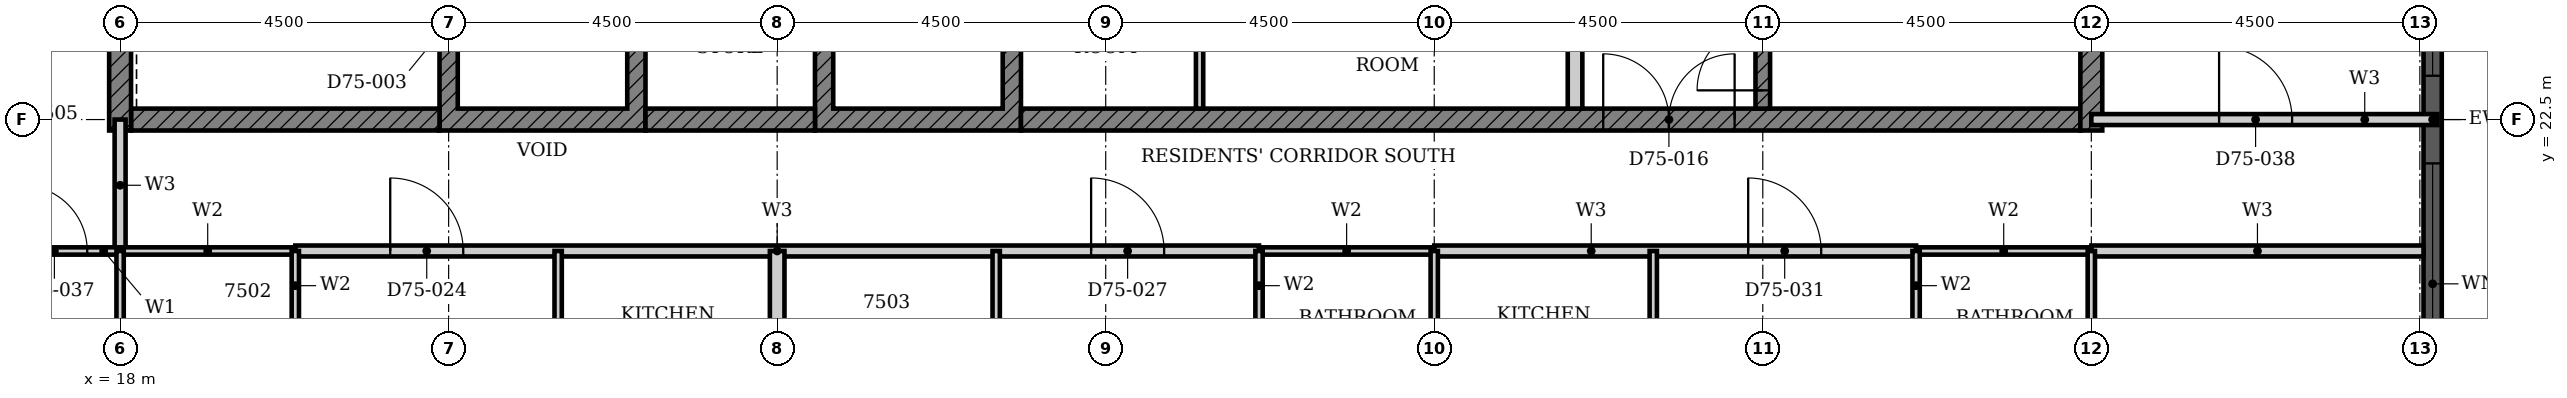
"""IFC4 building model, lengths in metres.
Left out: names, types, materials, properties, quantities, classifications, styles, units other than length and angle.
Written with IfcOpenShell. Run it as: python <this file> out.ifc"""

import sys

from ifc_helpers import new_model, si_unit, direction, frame, frame_2d, origin, place, context, subcontext, project, spatial, polyline, rectangle, outline, extrude, element, fill, save


model = new_model("IFC4")
c1 = context("Model", 3, precision=1e-05, world=origin(), true_north=direction((0.0, 1.0)))
c2 = subcontext(c1, "Body", "Model", "MODEL_VIEW")
j1 = project(units=[si_unit("LENGTHUNIT", "METRE"), si_unit("PLANEANGLEUNIT", "RADIAN")], contexts=[c1])
p1 = place(None, origin())
s1 = spatial("IfcSite", under=j1, at=p1, CompositionType="ELEMENT")
p2 = place(p1, origin())
s2 = spatial("IfcBuilding", under=s1, at=p2, CompositionType="ELEMENT")
p3 = place(p2, frame((0.0, 0.0, 294.5)))
s3 = spatial("IfcBuildingStorey", under=s2, at=p3, CompositionType="ELEMENT", Elevation=294.5)
p4 = place(p3, frame((49.675, 18.3, 0.0), z_axis=(0.0, 0.0, 1.0), x_axis=(0.0, 1.0, 0.0)))
e1 = element("IfcWall", 1, at=p4, inside=s3, PredefinedType="SOLIDWALL", context=c2, shape_type="SweptSolid", body=[
    extrude(rectangle(XDim=8.4, YDim=0.25, at=frame_2d((4.2, 0.0))), origin(), (0.0, 0.0, 1.0), 3.7),
])
p5 = place(p4, frame((0.3, 0.0, 0.45)))
e2 = element("IfcOpeningElement", 2, at=p5, cuts=e1, PredefinedType="OPENING", context=c2, shape_type="SweptSolid", body=[
    extrude(rectangle(XDim=3.3, YDim=2.3, at=frame_2d((1.65, 1.15))), frame((0.0, 0.135, 0.0), z_axis=(0.0, -1.0, 0.0), x_axis=(1.0, 0.0, 0.0)), (0.0, 0.0, 1.0), 0.27),
])
p6 = place(p4, frame((4.8, 0.0, 0.45)))
e3 = element("IfcOpeningElement", 3, at=p6, cuts=e1, PredefinedType="OPENING", context=c2, shape_type="SweptSolid", body=[
    extrude(rectangle(XDim=3.3, YDim=2.3, at=frame_2d((1.65, 1.15))), frame((0.0, 0.135, 0.0), z_axis=(0.0, -1.0, 0.0), x_axis=(1.0, 0.0, 0.0)), (0.0, 0.0, 1.0), 0.27),
])
p7 = place(p3, origin())
e4 = element("IfcWall", 4, at=p7, inside=s3, PredefinedType="SHEAR", context=c2, shape_type="SweptSolid", body=[
    extrude(outline(polyline([(22.375, 22.35), (25.197, 22.35), (25.197, 25.275), (24.947, 25.275), (24.947, 22.65), (22.625, 22.65), (22.625, 25.275), (22.375, 25.275), (22.375, 22.35)])), origin(), (0.0, 0.0, 1.0), 3.4),
])
p8 = place(p3, origin())
e5 = element("IfcWall", 5, at=p8, inside=s3, PredefinedType="SHEAR", context=c2, shape_type="SweptSolid", body=[
    extrude(outline(polyline([(27.518, 22.35), (30.339, 22.35), (30.339, 25.275), (30.089, 25.275), (30.089, 22.65), (27.768, 22.65), (27.768, 25.275), (27.518, 25.275), (27.518, 22.35)])), origin(), (0.0, 0.0, 1.0), 3.4),
])
p9 = place(p3, frame((18.15, 22.5, 0.0), z_axis=(0.0, 0.0, 1.0), x_axis=(1.0, 0.0, 0.0)))
e6 = element("IfcWall", 6, at=p9, inside=s3, PredefinedType="SHEAR", context=c2, shape_type="SweptSolid", body=[
    extrude(rectangle(XDim=4.225, YDim=0.3, at=frame_2d((2.113, 0.0))), origin(), (0.0, 0.0, 1.0), 3.4),
])
p10 = place(p3, frame((25.197, 22.5, 0.0), z_axis=(0.0, 0.0, 1.0), x_axis=(1.0, 0.0, 0.0)))
e7 = element("IfcWall", 7, at=p10, inside=s3, PredefinedType="SHEAR", context=c2, shape_type="SweptSolid", body=[
    extrude(rectangle(XDim=2.321, YDim=0.3, at=frame_2d((1.161, 0.0))), origin(), (0.0, 0.0, 1.0), 3.4),
])
p11 = place(p3, frame((30.339, 22.5, 0.0), z_axis=(0.0, 0.0, 1.0), x_axis=(1.0, 0.0, 0.0)))
e8 = element("IfcWall", 8, at=p11, inside=s3, PredefinedType="SHEAR", context=c2, shape_type="SweptSolid", body=[
    extrude(rectangle(XDim=14.511, YDim=0.3, at=frame_2d((7.255, 0.0))), origin(), (0.0, 0.0, 1.0), 3.4),
])
p12 = place(p11, frame((7.975, 0.0, 0.0)))
e9 = element("IfcOpeningElement", 9, at=p12, cuts=e8, PredefinedType="OPENING", context=c2, shape_type="SweptSolid", body=[
    extrude(rectangle(XDim=1.8, YDim=2.1, at=frame_2d((0.9, 1.05))), frame((0.0, 0.16, 0.0), z_axis=(0.0, -1.0, 0.0), x_axis=(1.0, 0.0, 0.0)), (0.0, 0.0, 1.0), 0.32),
])
for number, where, z_axis, x_axis in (
    (10, (18.0, 22.35, 0.0), (0.0, 0.0, 1.0), (0.0, 1.0, 0.0)),
    (11, (45.0, 22.35, 0.0), (0.0, 0.0, 1.0), (0.0, 1.0, 0.0)),
):
    element("IfcWall", number, at=place(p3, frame(where, z_axis=z_axis, x_axis=x_axis)), inside=s3, PredefinedType="SHEAR", context=c2, shape_type="SweptSolid", body=[
        extrude(rectangle(XDim=9.3, YDim=0.3, at=frame_2d((4.65, 0.0))), origin(), (0.0, 0.0, 1.0), 3.4),
    ])
p13 = place(p3, frame((37.928, 22.65, 0.0), z_axis=(0.0, 0.0, 1.0), x_axis=(0.0, 1.0, 0.0)))
e12 = element("IfcWall", 12, at=p13, inside=s3, PredefinedType="PARTITIONING", context=c2, shape_type="SweptSolid", body=[
    extrude(rectangle(XDim=2.625, YDim=0.2, at=frame_2d((1.312, 0.0))), origin(), (0.0, 0.0, 1.0), 3.4),
])
p14 = place(p3, frame((32.786, 22.65, 0.0), z_axis=(0.0, 0.0, 1.0), x_axis=(0.0, 1.0, 0.0)))
e13 = element("IfcWall", 13, at=p14, inside=s3, PredefinedType="PARTITIONING", context=c2, shape_type="SweptSolid", body=[
    extrude(rectangle(XDim=2.625, YDim=0.1, at=frame_2d((1.312, 0.0))), origin(), (0.0, 0.0, 1.0), 3.4),
])
p15 = place(p3, frame((40.5, 22.65, 0.0), z_axis=(0.0, 0.0, 1.0), x_axis=(0.0, 1.0, 0.0)))
e14 = element("IfcWall", 14, at=p15, inside=s3, PredefinedType="SHEAR", context=c2, shape_type="SweptSolid", body=[
    extrude(rectangle(XDim=5.825, YDim=0.2, at=frame_2d((2.913, 0.0))), origin(), (0.0, 0.0, 1.0), 3.4),
])
p16 = place(p15, frame((0.25, 0.0, 0.0)))
e15 = element("IfcOpeningElement", 15, at=p16, cuts=e14, PredefinedType="OPENING", context=c2, shape_type="SweptSolid", body=[
    extrude(rectangle(XDim=1.8, YDim=2.1, at=frame_2d((0.9, 1.05))), frame((0.0, 0.11, 0.0), z_axis=(0.0, -1.0, 0.0), x_axis=(1.0, 0.0, 0.0)), (0.0, 0.0, 1.0), 0.22),
])
p17 = place(p3, frame((20.4, 20.7, 0.0), z_axis=(0.0, 0.0, 1.0), x_axis=(1.0, 0.0, 0.0)))
e16 = element("IfcWall", 16, at=p17, inside=s3, PredefinedType="PARTITIONING", context=c2, shape_type="SweptSolid", body=[
    extrude(rectangle(XDim=13.2, YDim=0.15, at=frame_2d((6.6, 0.0))), origin(), (0.0, 0.0, 1.0), 3.4),
])
p18 = place(p17, frame((1.3, 0.0, 0.0)))
e17 = element("IfcOpeningElement", 17, at=p18, cuts=e16, PredefinedType="OPENING", context=c2, shape_type="SweptSolid", body=[
    extrude(rectangle(XDim=1.0, YDim=2.2, at=frame_2d((0.5, 1.1))), frame((0.0, 0.085, 0.0), z_axis=(0.0, -1.0, 0.0), x_axis=(1.0, 0.0, 0.0)), (0.0, 0.0, 1.0), 0.17),
])
p19 = place(p17, frame((10.9, 0.0, 0.0)))
e18 = element("IfcOpeningElement", 18, at=p19, cuts=e16, PredefinedType="OPENING", context=c2, shape_type="SweptSolid", body=[
    extrude(rectangle(XDim=1.0, YDim=2.2, at=frame_2d((0.5, 1.1))), frame((0.0, 0.085, 0.0), z_axis=(0.0, -1.0, 0.0), x_axis=(1.0, 0.0, 0.0)), (0.0, 0.0, 1.0), 0.17),
])
p20 = place(p3, frame((45.001, 20.7, 0.0), z_axis=(0.0, 0.0, 1.0), x_axis=(1.0, 0.0, 0.0)))
e19 = element("IfcWall", 19, at=p20, inside=s3, PredefinedType="PARTITIONING", context=c2, shape_type="SweptSolid", body=[
    extrude(rectangle(XDim=4.549, YDim=0.15, at=frame_2d((2.274, 0.0))), origin(), (0.0, 0.0, 1.0), 3.4),
])
p21 = place(p3, frame((36.0, 20.7, 0.0), z_axis=(0.0, 0.0, 1.0), x_axis=(1.0, 0.0, 0.0)))
e20 = element("IfcWall", 20, at=p21, inside=s3, PredefinedType="PARTITIONING", context=c2, shape_type="SweptSolid", body=[
    extrude(rectangle(XDim=6.6, YDim=0.15, at=frame_2d((3.3, 0.0))), origin(), (0.0, 0.0, 1.0), 3.4),
])
p22 = place(p21, frame((4.3, 0.0, 0.0)))
e21 = element("IfcOpeningElement", 21, at=p22, cuts=e20, PredefinedType="OPENING", context=c2, shape_type="SweptSolid", body=[
    extrude(rectangle(XDim=1.0, YDim=2.2, at=frame_2d((0.5, 1.1))), frame((0.0, 0.085, 0.0), z_axis=(0.0, -1.0, 0.0), x_axis=(1.0, 0.0, 0.0)), (0.0, 0.0, 1.0), 0.17),
])
p23 = place(p3, frame((45.0, 22.5, 0.0), z_axis=(0.0, 0.0, 1.0), x_axis=(1.0, 0.0, 0.0)))
e22 = element("IfcWall", 22, at=p23, inside=s3, PredefinedType="PARTITIONING", context=c2, shape_type="SweptSolid", body=[
    extrude(rectangle(XDim=4.74, YDim=0.15, at=frame_2d((2.37, 0.0))), origin(), (0.0, 0.0, 1.0), 3.4),
])
p24 = place(p23, frame((1.75, 0.0, 0.0)))
e23 = element("IfcOpeningElement", 23, at=p24, cuts=e22, PredefinedType="OPENING", context=c2, shape_type="SweptSolid", body=[
    extrude(rectangle(XDim=1.0, YDim=2.1, at=frame_2d((0.5, 1.05))), frame((0.0, 0.085, 0.0), z_axis=(0.0, -1.0, 0.0), x_axis=(1.0, 0.0, 0.0)), (0.0, 0.0, 1.0), 0.17),
])
p25 = place(p3, frame((18.0, 20.7, 0.0), z_axis=(0.0, 0.0, 1.0), x_axis=(0.0, 1.0, 0.0)))
e24 = element("IfcWall", 24, at=p25, inside=s3, PredefinedType="PARTITIONING", context=c2, shape_type="SweptSolid", body=[
    extrude(rectangle(XDim=1.8, YDim=0.15, at=frame_2d((0.9, 0.0))), origin(), (0.0, 0.0, 1.0), 3.4),
])
p26 = place(p3, frame((16.2, 20.7, 0.0), z_axis=(0.0, 0.0, 1.0), x_axis=(1.0, 0.0, 0.0)))
e25 = element("IfcWall", 25, at=p26, inside=s3, PredefinedType="PARTITIONING", context=c2, shape_type="SweptSolid", body=[
    extrude(rectangle(XDim=1.8, YDim=0.1, at=frame_2d((0.9, 0.0))), origin(), (0.0, 0.0, 1.0), 3.4),
])
p27 = place(p26, frame((0.45, 0.0, 0.0)))
e26 = element("IfcOpeningElement", 26, at=p27, cuts=e25, PredefinedType="OPENING", context=c2, shape_type="SweptSolid", body=[
    extrude(rectangle(XDim=0.9, YDim=2.1, at=frame_2d((0.45, 1.05))), frame((0.0, 0.06, 0.0), z_axis=(0.0, -1.0, 0.0), x_axis=(1.0, 0.0, 0.0)), (0.0, 0.0, 1.0), 0.12),
])
for number, where, z_axis, x_axis in (
    (27, (24.0, 18.0, 0.0), (0.0, 0.0, 1.0), (0.0, 1.0, 0.0)),
    (28, (30.0, 18.0, 0.0), (0.0, 0.0, 1.0), (0.0, 1.0, 0.0)),
    (29, (39.0, 18.0, 0.0), (0.0, 0.0, 1.0), (0.0, 1.0, 0.0)),
):
    element("IfcWall", number, at=place(p3, frame(where, z_axis=z_axis, x_axis=x_axis)), inside=s3, PredefinedType="PARTITIONING", context=c2, shape_type="SweptSolid", body=[
        extrude(rectangle(XDim=2.7, YDim=0.1, at=frame_2d((1.35, 0.0))), origin(), (0.0, 0.0, 1.0), 3.4),
    ])
p28 = place(p3, frame((27.0, 13.31, 0.0), z_axis=(0.0, 0.0, 1.0), x_axis=(0.0, 1.0, 0.0)))
e30 = element("IfcWall", 30, at=p28, inside=s3, PredefinedType="PARTITIONING", context=c2, shape_type="SweptSolid", body=[
    extrude(rectangle(XDim=7.39, YDim=0.2, at=frame_2d((3.695, 0.0))), origin(), (0.0, 0.0, 1.0), 3.4),
])
for number, where, z_axis, x_axis in (
    (31, (18.0, 20.7, 0.0), (0.0, 0.0, 1.0), (1.0, 0.0, 0.0)),
    (32, (33.6, 20.7, 0.0), (0.0, 0.0, 1.0), (1.0, 0.0, 0.0)),
    (33, (42.6, 20.7, 0.0), (0.0, 0.0, 1.0), (1.0, 0.0, 0.0)),
):
    element("IfcWall", number, at=place(p3, frame(where, z_axis=z_axis, x_axis=x_axis)), inside=s3, PredefinedType="PARTITIONING", context=c2, shape_type="SweptSolid", body=[
        extrude(rectangle(XDim=2.4, YDim=0.1, at=frame_2d((1.2, 0.0))), origin(), (0.0, 0.0, 1.0), 3.4),
    ])
p29 = place(p3, frame((18.0, 18.0, 0.0), z_axis=(0.0, 0.0, 1.0), x_axis=(0.0, 1.0, 0.0)))
e34 = element("IfcWall", 34, at=p29, inside=s3, PredefinedType="PARTITIONING", context=c2, shape_type="SweptSolid", body=[
    extrude(rectangle(XDim=2.7, YDim=0.1, at=frame_2d((1.35, 0.0))), origin(), (0.0, 0.0, 1.0), 3.4),
])
p30 = place(p3, frame((20.4, 18.0, 0.0), z_axis=(0.0, 0.0, 1.0), x_axis=(0.0, 1.0, 0.0)))
e35 = element("IfcWall", 35, at=p30, inside=s3, PredefinedType="PARTITIONING", context=c2, shape_type="SweptSolid", body=[
    extrude(rectangle(XDim=2.7, YDim=0.1, at=frame_2d((1.35, 0.0))), origin(), (0.0, 0.0, 1.0), 3.4),
])
p31 = place(p30, frame((0.95, 0.0, 0.0)))
e36 = element("IfcOpeningElement", 36, at=p31, cuts=e35, PredefinedType="OPENING", context=c2, shape_type="SweptSolid", body=[
    extrude(rectangle(XDim=0.8, YDim=2.1, at=frame_2d((0.4, 1.05))), frame((0.0, 0.06, 0.0), z_axis=(0.0, -1.0, 0.0), x_axis=(1.0, 0.0, 0.0)), (0.0, 0.0, 1.0), 0.12),
])
p32 = place(p3, frame((33.6, 18.0, 0.0), z_axis=(0.0, 0.0, 1.0), x_axis=(0.0, 1.0, 0.0)))
e37 = element("IfcWall", 37, at=p32, inside=s3, PredefinedType="PARTITIONING", context=c2, shape_type="SweptSolid", body=[
    extrude(rectangle(XDim=2.7, YDim=0.1, at=frame_2d((1.35, 0.0))), origin(), (0.0, 0.0, 1.0), 3.4),
])
p33 = place(p32, frame((0.95, 0.0, 0.0)))
e38 = element("IfcOpeningElement", 38, at=p33, cuts=e37, PredefinedType="OPENING", context=c2, shape_type="SweptSolid", body=[
    extrude(rectangle(XDim=0.8, YDim=2.1, at=frame_2d((0.4, 1.05))), frame((0.0, 0.06, 0.0), z_axis=(0.0, -1.0, 0.0), x_axis=(1.0, 0.0, 0.0)), (0.0, 0.0, 1.0), 0.12),
])
p34 = place(p3, frame((36.0, 18.0, 0.0), z_axis=(0.0, 0.0, 1.0), x_axis=(0.0, 1.0, 0.0)))
e39 = element("IfcWall", 39, at=p34, inside=s3, PredefinedType="PARTITIONING", context=c2, shape_type="SweptSolid", body=[
    extrude(rectangle(XDim=2.7, YDim=0.1, at=frame_2d((1.35, 0.0))), origin(), (0.0, 0.0, 1.0), 3.4),
])
p35 = place(p3, frame((42.6, 18.0, 0.0), z_axis=(0.0, 0.0, 1.0), x_axis=(0.0, 1.0, 0.0)))
e40 = element("IfcWall", 40, at=p35, inside=s3, PredefinedType="PARTITIONING", context=c2, shape_type="SweptSolid", body=[
    extrude(rectangle(XDim=2.7, YDim=0.1, at=frame_2d((1.35, 0.0))), origin(), (0.0, 0.0, 1.0), 3.4),
])
p36 = place(p35, frame((0.95, 0.0, 0.0)))
e41 = element("IfcOpeningElement", 41, at=p36, cuts=e40, PredefinedType="OPENING", context=c2, shape_type="SweptSolid", body=[
    extrude(rectangle(XDim=0.8, YDim=2.1, at=frame_2d((0.4, 1.05))), frame((0.0, 0.06, 0.0), z_axis=(0.0, -1.0, 0.0), x_axis=(1.0, 0.0, 0.0)), (0.0, 0.0, 1.0), 0.12),
])
p37 = place(p3, frame((45.0, 18.0, 0.0), z_axis=(0.0, 0.0, 1.0), x_axis=(0.0, 1.0, 0.0)))
e42 = element("IfcWall", 42, at=p37, inside=s3, PredefinedType="PARTITIONING", context=c2, shape_type="SweptSolid", body=[
    extrude(rectangle(XDim=2.699, YDim=0.1, at=frame_2d((1.35, 0.0))), origin(), (0.0, 0.0, 1.0), 3.4),
])
p38 = place(p5, origin())
e43 = element("IfcWindow", 43, at=p38, inside=s3, PartitioningType="SINGLE_PANEL", PredefinedType="WINDOW", context=c2, shape_type="SweptSolid", body=[
    extrude(rectangle(XDim=3.3, YDim=2.3, at=frame_2d((1.65, 1.15))), frame((0.0, 0.03, 0.0), z_axis=(0.0, -1.0, 0.0), x_axis=(1.0, 0.0, 0.0)), (0.0, 0.0, 1.0), 0.06),
])
fill(e2, e43)
p39 = place(p6, origin())
e44 = element("IfcWindow", 44, at=p39, inside=s3, PartitioningType="SINGLE_PANEL", PredefinedType="WINDOW", context=c2, shape_type="SweptSolid", body=[
    extrude(rectangle(XDim=3.3, YDim=2.3, at=frame_2d((1.65, 1.15))), frame((0.0, 0.03, 0.0), z_axis=(0.0, -1.0, 0.0), x_axis=(1.0, 0.0, 0.0)), (0.0, 0.0, 1.0), 0.06),
])
fill(e3, e44)
p40 = place(p16, origin())
e45 = element("IfcDoor", 45, at=p40, inside=s3, OperationType="DOUBLE_DOOR_SINGLE_SWING", PredefinedType="DOOR", context=c2, shape_type="SweptSolid", body=[
    extrude(rectangle(XDim=1.8, YDim=2.1, at=frame_2d((0.9, 1.05))), frame((0.0, 0.025, 0.0), z_axis=(0.0, -1.0, 0.0), x_axis=(1.0, 0.0, 0.0)), (0.0, 0.0, 1.0), 0.05),
])
fill(e15, e45)
p41 = place(p12, origin())
e46 = element("IfcDoor", 46, at=p41, inside=s3, OperationType="DOUBLE_DOOR_SINGLE_SWING", PredefinedType="DOOR", context=c2, shape_type="SweptSolid", body=[
    extrude(rectangle(XDim=1.8, YDim=2.1, at=frame_2d((0.9, 1.05))), frame((0.0, 0.025, 0.0), z_axis=(0.0, -1.0, 0.0), x_axis=(1.0, 0.0, 0.0)), (0.0, 0.0, 1.0), 0.05),
])
fill(e9, e46)
p42 = place(p18, origin())
e47 = element("IfcDoor", 47, at=p42, inside=s3, OperationType="SINGLE_SWING_RIGHT", PredefinedType="DOOR", context=c2, shape_type="SweptSolid", body=[
    extrude(rectangle(XDim=1.0, YDim=2.2, at=frame_2d((0.5, 1.1))), frame((0.0, 0.025, 0.0), z_axis=(0.0, -1.0, 0.0), x_axis=(1.0, 0.0, 0.0)), (0.0, 0.0, 1.0), 0.05),
])
fill(e17, e47)
p43 = place(p19, origin())
e48 = element("IfcDoor", 48, at=p43, inside=s3, OperationType="SINGLE_SWING_RIGHT", PredefinedType="DOOR", context=c2, shape_type="SweptSolid", body=[
    extrude(rectangle(XDim=1.0, YDim=2.2, at=frame_2d((0.5, 1.1))), frame((0.0, 0.025, 0.0), z_axis=(0.0, -1.0, 0.0), x_axis=(1.0, 0.0, 0.0)), (0.0, 0.0, 1.0), 0.05),
])
fill(e18, e48)
p44 = place(p22, origin())
e49 = element("IfcDoor", 49, at=p44, inside=s3, OperationType="SINGLE_SWING_LEFT", PredefinedType="DOOR", context=c2, shape_type="SweptSolid", body=[
    extrude(rectangle(XDim=1.0, YDim=2.2, at=frame_2d((0.5, 1.1))), frame((0.0, 0.025, 0.0), z_axis=(0.0, -1.0, 0.0), x_axis=(1.0, 0.0, 0.0)), (0.0, 0.0, 1.0), 0.05),
])
fill(e21, e49)
p45 = place(p27, origin())
e50 = element("IfcDoor", 50, at=p45, inside=s3, OperationType="SINGLE_SWING_LEFT", PredefinedType="DOOR", context=c2, shape_type="SweptSolid", body=[
    extrude(rectangle(XDim=0.9, YDim=2.1, at=frame_2d((0.45, 1.05))), frame((0.0, 0.025, 0.0), z_axis=(0.0, -1.0, 0.0), x_axis=(1.0, 0.0, 0.0)), (0.0, 0.0, 1.0), 0.05),
])
fill(e26, e50)
p46 = place(p24, origin())
e51 = element("IfcDoor", 51, at=p46, inside=s3, OperationType="SINGLE_SWING_RIGHT", PredefinedType="DOOR", context=c2, shape_type="SweptSolid", body=[
    extrude(rectangle(XDim=1.0, YDim=2.1, at=frame_2d((0.5, 1.05))), frame((0.0, 0.025, 0.0), z_axis=(0.0, -1.0, 0.0), x_axis=(1.0, 0.0, 0.0)), (0.0, 0.0, 1.0), 0.05),
])
fill(e23, e51)
save(model, sys.argv[1])
